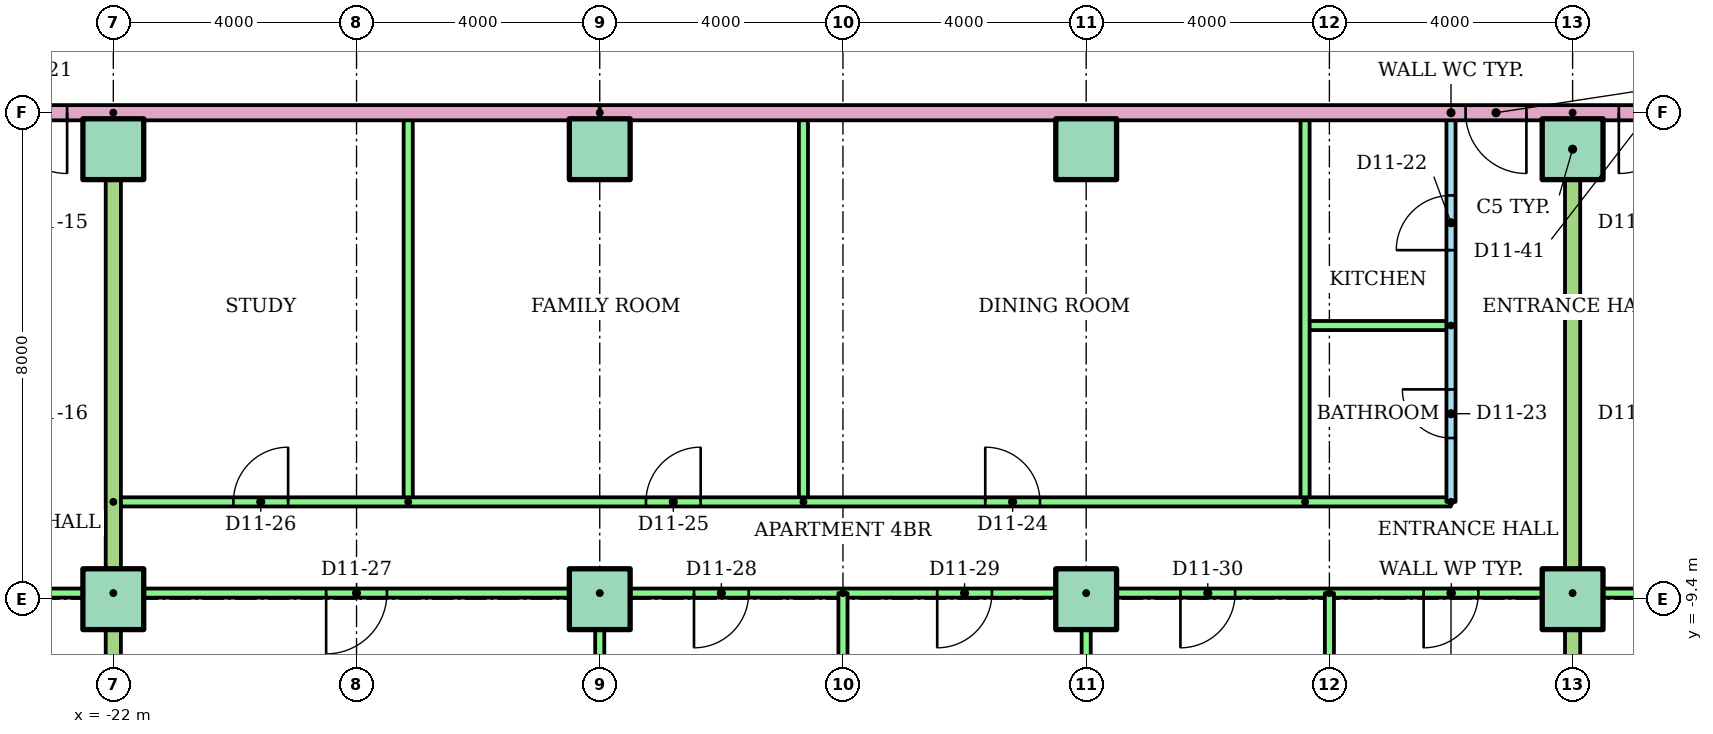
"""IFC4 building model, lengths in metres.
Left out: names, types, materials, properties, quantities, classifications, styles, units other than length and angle.
Written with IfcOpenShell. Run it as: python <this file> out.ifc"""

import sys

from ifc_helpers import new_model, si_unit, direction, frame, frame_2d, origin, origin_2d, place, context, subcontext, project, spatial, rectangle, extrude, element, fill, save


model = new_model("IFC4")
c1 = context("Model", 3, precision=1e-05, world=origin(), true_north=direction((0.0, 1.0)))
c2 = subcontext(c1, "Body", "Model", "MODEL_VIEW")
j1 = project(units=[si_unit("LENGTHUNIT", "METRE"), si_unit("PLANEANGLEUNIT", "RADIAN")], contexts=[c1])
p1 = place(None, origin())
s1 = spatial("IfcSite", under=j1, at=p1, CompositionType="ELEMENT")
p2 = place(p1, origin())
s2 = spatial("IfcBuilding", under=s1, at=p2, CompositionType="ELEMENT")
p3 = place(p2, frame((0.0, 0.0, 44.8)))
s3 = spatial("IfcBuildingStorey", under=s2, at=p3, CompositionType="ELEMENT", Elevation=44.8)
for number, where in (
    (1, (-22.0, -9.4, 0.0)),
    (2, (-14.0, -9.4, 0.0)),
    (3, (-6.0, -9.4, 0.0)),
    (4, (2.0, -9.4, 0.0)),
    (5, (-22.0, -2.0, 0.0)),
    (6, (-14.0, -2.0, 0.0)),
    (7, (-6.0, -2.0, 0.0)),
    (8, (2.0, -2.0, 0.0)),
):
    element("IfcColumn", number, at=place(p3, frame(where)), inside=s3, PredefinedType="COLUMN", context=c2, shape_type="SweptSolid", body=[
        extrude(rectangle(XDim=1.0, YDim=1.0, at=origin_2d()), origin(), (0.0, 0.0, 1.0), 3.2),
    ])
p4 = place(p3, frame((-22.0, -9.3, 0.0), z_axis=(0.0, 0.0, 1.0), x_axis=(-1.0, 0.0, 0.0)))
e9 = element("IfcWall", 9, at=p4, inside=s3, PredefinedType="PARTITIONING", context=c2, shape_type="SweptSolid", body=[
    extrude(rectangle(XDim=14.51, YDim=0.15, at=frame_2d((7.255, 0.0))), origin(), (0.0, 0.0, 1.0), 2.4),
])
p5 = place(p4, frame((11.6, 0.0, 0.0)))
e10 = element("IfcOpeningElement", 10, at=p5, cuts=e9, PredefinedType="OPENING", context=c2, shape_type="SweptSolid", body=[
    extrude(rectangle(XDim=0.9, YDim=2.1, at=frame_2d((0.45, 1.05))), frame((0.0, 0.085, 0.0), z_axis=(0.0, -1.0, 0.0), x_axis=(1.0, 0.0, 0.0)), (0.0, 0.0, 1.0), 0.17),
])
p6 = place(p4, frame((4.4, 0.0, 0.0)))
e11 = element("IfcOpeningElement", 11, at=p6, cuts=e9, PredefinedType="OPENING", context=c2, shape_type="SweptSolid", body=[
    extrude(rectangle(XDim=1.0, YDim=2.1, at=frame_2d((0.5, 1.05))), frame((0.0, 0.085, 0.0), z_axis=(0.0, -1.0, 0.0), x_axis=(1.0, 0.0, 0.0)), (0.0, 0.0, 1.0), 0.17),
])
p7 = place(p3, frame((0.0, -7.8, 0.0), z_axis=(0.0, 0.0, 1.0), x_axis=(0.0, 1.0, 0.0)))
e12 = element("IfcWall", 12, at=p7, inside=s3, PredefinedType="PARTITIONING", context=c2, shape_type="SweptSolid", body=[
    extrude(rectangle(XDim=6.4, YDim=0.15, at=frame_2d((3.2, 0.0))), origin(), (0.0, 0.0, 1.0), 2.4),
])
p8 = place(p7, frame((4.14, 0.0, 0.0)))
e13 = element("IfcOpeningElement", 13, at=p8, cuts=e12, PredefinedType="OPENING", context=c2, shape_type="SweptSolid", body=[
    extrude(rectangle(XDim=0.9, YDim=2.1, at=frame_2d((0.45, 1.05))), frame((0.0, 0.085, 0.0), z_axis=(0.0, -1.0, 0.0), x_axis=(1.0, 0.0, 0.0)), (0.0, 0.0, 1.0), 0.17),
])
p9 = place(p7, frame((1.05, 0.0, 0.0)))
e14 = element("IfcOpeningElement", 14, at=p9, cuts=e12, PredefinedType="OPENING", context=c2, shape_type="SweptSolid", body=[
    extrude(rectangle(XDim=0.8, YDim=2.1, at=frame_2d((0.4, 1.05))), frame((0.0, 0.085, 0.0), z_axis=(0.0, -1.0, 0.0), x_axis=(1.0, 0.0, 0.0)), (0.0, 0.0, 1.0), 0.17),
])
p10 = place(p3, frame((0.0, -4.9, 0.0), z_axis=(0.0, 0.0, 1.0), x_axis=(-1.0, 0.0, 0.0)))
e15 = element("IfcWall", 15, at=p10, inside=s3, PredefinedType="PARTITIONING", context=c2, shape_type="SweptSolid", body=[
    extrude(rectangle(XDim=2.4, YDim=0.15, at=frame_2d((1.2, 0.0))), origin(), (0.0, 0.0, 1.0), 2.4),
])
for number, where, z_axis, x_axis in (
    (16, (-2.4, -7.8, 0.0), (0.0, 0.0, 1.0), (0.0, 1.0, 0.0)),
    (17, (-10.65, -7.8, 0.0), (0.0, 0.0, 1.0), (0.0, 1.0, 0.0)),
    (18, (-17.15, -7.8, 0.0), (0.0, 0.0, 1.0), (0.0, 1.0, 0.0)),
):
    element("IfcWall", number, at=place(p3, frame(where, z_axis=z_axis, x_axis=x_axis)), inside=s3, PredefinedType="PARTITIONING", context=c2, shape_type="SweptSolid", body=[
        extrude(rectangle(XDim=6.4, YDim=0.15, at=frame_2d((3.2, 0.0))), origin(), (0.0, 0.0, 1.0), 2.4),
    ])
p11 = place(p3, frame((-22.0, -7.8, 0.0)))
e19 = element("IfcWall", 19, at=p11, inside=s3, PredefinedType="PARTITIONING", context=c2, shape_type="SweptSolid", body=[
    extrude(rectangle(XDim=22.0, YDim=0.15, at=frame_2d((11.0, 0.0))), origin(), (0.0, 0.0, 1.0), 2.4),
])
p12 = place(p11, frame((14.34, 0.0, 0.0)))
e20 = element("IfcOpeningElement", 20, at=p12, cuts=e19, PredefinedType="OPENING", context=c2, shape_type="SweptSolid", body=[
    extrude(rectangle(XDim=0.9, YDim=2.1, at=frame_2d((0.45, 1.05))), frame((0.0, 0.085, 0.0), z_axis=(0.0, -1.0, 0.0), x_axis=(1.0, 0.0, 0.0)), (0.0, 0.0, 1.0), 0.17),
])
p13 = place(p11, frame((8.76, 0.0, 0.0)))
e21 = element("IfcOpeningElement", 21, at=p13, cuts=e19, PredefinedType="OPENING", context=c2, shape_type="SweptSolid", body=[
    extrude(rectangle(XDim=0.9, YDim=2.1, at=frame_2d((0.45, 1.05))), frame((0.0, 0.085, 0.0), z_axis=(0.0, -1.0, 0.0), x_axis=(1.0, 0.0, 0.0)), (0.0, 0.0, 1.0), 0.17),
])
p14 = place(p11, frame((1.975, 0.0, 0.0)))
e22 = element("IfcOpeningElement", 22, at=p14, cuts=e19, PredefinedType="OPENING", context=c2, shape_type="SweptSolid", body=[
    extrude(rectangle(XDim=0.9, YDim=2.1, at=frame_2d((0.45, 1.05))), frame((0.0, 0.085, 0.0), z_axis=(0.0, -1.0, 0.0), x_axis=(1.0, 0.0, 0.0)), (0.0, 0.0, 1.0), 0.17),
])
p15 = place(p3, frame((2.0, -9.3, 0.0), z_axis=(0.0, 0.0, 1.0), x_axis=(-1.0, 0.0, 0.0)))
e23 = element("IfcWall", 23, at=p15, inside=s3, PredefinedType="PARTITIONING", context=c2, shape_type="SweptSolid", body=[
    extrude(rectangle(XDim=24.0, YDim=0.15, at=frame_2d((12.0, 0.0))), origin(), (0.0, 0.0, 1.0), 2.4),
])
p16 = place(p15, frame((19.5, 0.0, 0.0)))
e24 = element("IfcOpeningElement", 24, at=p16, cuts=e23, PredefinedType="OPENING", context=c2, shape_type="SweptSolid", body=[
    extrude(rectangle(XDim=1.0, YDim=2.1, at=frame_2d((0.5, 1.05))), frame((0.0, 0.085, 0.0), z_axis=(0.0, -1.0, 0.0), x_axis=(1.0, 0.0, 0.0)), (0.0, 0.0, 1.0), 0.17),
])
p17 = place(p15, frame((13.55, 0.0, 0.0)))
e25 = element("IfcOpeningElement", 25, at=p17, cuts=e23, PredefinedType="OPENING", context=c2, shape_type="SweptSolid", body=[
    extrude(rectangle(XDim=0.9, YDim=2.1, at=frame_2d((0.45, 1.05))), frame((0.0, 0.085, 0.0), z_axis=(0.0, -1.0, 0.0), x_axis=(1.0, 0.0, 0.0)), (0.0, 0.0, 1.0), 0.17),
])
p18 = place(p15, frame((9.55, 0.0, 0.0)))
e26 = element("IfcOpeningElement", 26, at=p18, cuts=e23, PredefinedType="OPENING", context=c2, shape_type="SweptSolid", body=[
    extrude(rectangle(XDim=0.9, YDim=2.1, at=frame_2d((0.45, 1.05))), frame((0.0, 0.085, 0.0), z_axis=(0.0, -1.0, 0.0), x_axis=(1.0, 0.0, 0.0)), (0.0, 0.0, 1.0), 0.17),
])
p19 = place(p15, frame((5.55, 0.0, 0.0)))
e27 = element("IfcOpeningElement", 27, at=p19, cuts=e23, PredefinedType="OPENING", context=c2, shape_type="SweptSolid", body=[
    extrude(rectangle(XDim=0.9, YDim=2.1, at=frame_2d((0.45, 1.05))), frame((0.0, 0.085, 0.0), z_axis=(0.0, -1.0, 0.0), x_axis=(1.0, 0.0, 0.0)), (0.0, 0.0, 1.0), 0.17),
])
p20 = place(p15, frame((1.55, 0.0, 0.0)))
e28 = element("IfcOpeningElement", 28, at=p20, cuts=e23, PredefinedType="OPENING", context=c2, shape_type="SweptSolid", body=[
    extrude(rectangle(XDim=0.9, YDim=2.1, at=frame_2d((0.45, 1.05))), frame((0.0, 0.085, 0.0), z_axis=(0.0, -1.0, 0.0), x_axis=(1.0, 0.0, 0.0)), (0.0, 0.0, 1.0), 0.17),
])
p21 = place(p3, frame((-14.0, -9.3, 0.0), z_axis=(0.0, 0.0, 1.0), x_axis=(0.0, -1.0, 0.0)))
e29 = element("IfcWall", 29, at=p21, inside=s3, PredefinedType="PARTITIONING", context=c2, shape_type="SweptSolid", body=[
    extrude(rectangle(XDim=6.81, YDim=0.15, at=frame_2d((3.405, 0.0))), origin(), (0.0, 0.0, 1.0), 2.4),
])
p22 = place(p3, frame((-10.0, -9.3, 0.0), z_axis=(0.0, 0.0, 1.0), x_axis=(0.0, -1.0, 0.0)))
e30 = element("IfcWall", 30, at=p22, inside=s3, PredefinedType="PARTITIONING", context=c2, shape_type="SweptSolid", body=[
    extrude(rectangle(XDim=6.821, YDim=0.15, at=frame_2d((3.411, 0.0))), origin(), (0.0, 0.0, 1.0), 2.4),
])
p23 = place(p3, frame((-6.0, -9.3, 0.0), z_axis=(0.0, 0.0, 1.0), x_axis=(0.0, -1.0, 0.0)))
e31 = element("IfcWall", 31, at=p23, inside=s3, PredefinedType="PARTITIONING", context=c2, shape_type="SweptSolid", body=[
    extrude(rectangle(XDim=6.81, YDim=0.15, at=frame_2d((3.405, 0.0))), origin(), (0.0, 0.0, 1.0), 2.4),
])
p24 = place(p3, frame((-2.0, -9.3, 0.0), z_axis=(0.0, 0.0, 1.0), x_axis=(0.0, -1.0, 0.0)))
e32 = element("IfcWall", 32, at=p24, inside=s3, PredefinedType="PARTITIONING", context=c2, shape_type="SweptSolid", body=[
    extrude(rectangle(XDim=6.821, YDim=0.15, at=frame_2d((3.411, 0.0))), origin(), (0.0, 0.0, 1.0), 2.4),
])
p25 = place(p3, frame((-22.0, -1.4, 0.0), z_axis=(0.0, 0.0, 1.0), x_axis=(0.0, -1.0, 0.0)))
e33 = element("IfcWall", 33, at=p25, inside=s3, PredefinedType="PARTITIONING", context=c2, shape_type="SweptSolid", body=[
    extrude(rectangle(XDim=14.71, YDim=0.25, at=frame_2d((7.355, 0.0))), origin(), (0.0, 0.0, 1.0), 2.4),
])
p26 = place(p3, frame((18.0, -9.3, 0.0), z_axis=(0.0, 0.0, 1.0), x_axis=(-1.0, 0.0, 0.0)))
e34 = element("IfcWall", 34, at=p26, inside=s3, PredefinedType="PARTITIONING", context=c2, shape_type="SweptSolid", body=[
    extrude(rectangle(XDim=16.0, YDim=0.15, at=frame_2d((8.0, 0.0))), origin(), (0.0, 0.0, 1.0), 2.4),
])
p27 = place(p26, frame((11.5, 0.0, 0.0)))
e35 = element("IfcOpeningElement", 35, at=p27, cuts=e34, PredefinedType="OPENING", context=c2, shape_type="SweptSolid", body=[
    extrude(rectangle(XDim=1.0, YDim=2.1, at=frame_2d((0.5, 1.05))), frame((0.0, 0.085, 0.0), z_axis=(0.0, -1.0, 0.0), x_axis=(1.0, 0.0, 0.0)), (0.0, 0.0, 1.0), 0.17),
])
p28 = place(p26, frame((5.55, 0.0, 0.0)))
e36 = element("IfcOpeningElement", 36, at=p28, cuts=e34, PredefinedType="OPENING", context=c2, shape_type="SweptSolid", body=[
    extrude(rectangle(XDim=0.9, YDim=2.1, at=frame_2d((0.45, 1.05))), frame((0.0, 0.085, 0.0), z_axis=(0.0, -1.0, 0.0), x_axis=(1.0, 0.0, 0.0)), (0.0, 0.0, 1.0), 0.17),
])
p29 = place(p26, frame((1.55, 0.0, 0.0)))
e37 = element("IfcOpeningElement", 37, at=p29, cuts=e34, PredefinedType="OPENING", context=c2, shape_type="SweptSolid", body=[
    extrude(rectangle(XDim=0.9, YDim=2.1, at=frame_2d((0.45, 1.05))), frame((0.0, 0.085, 0.0), z_axis=(0.0, -1.0, 0.0), x_axis=(1.0, 0.0, 0.0)), (0.0, 0.0, 1.0), 0.17),
])
p30 = place(p3, frame((2.0, -1.4, 0.0), z_axis=(0.0, 0.0, 1.0), x_axis=(0.0, -1.0, 0.0)))
e38 = element("IfcWall", 38, at=p30, inside=s3, PredefinedType="PARTITIONING", context=c2, shape_type="SweptSolid", body=[
    extrude(rectangle(XDim=14.71, YDim=0.25, at=frame_2d((7.355, 0.0))), origin(), (0.0, 0.0, 1.0), 2.4),
])
p31 = place(p3, frame((-14.0, -1.4, 0.0), z_axis=(0.0, 0.0, 1.0), x_axis=(-1.0, 0.0, 0.0)))
e39 = element("IfcWall", 39, at=p31, inside=s3, PredefinedType="PARTITIONING", context=c2, shape_type="SweptSolid", body=[
    extrude(rectangle(XDim=15.0, YDim=0.25, at=frame_2d((7.5, 0.0))), origin(), (0.0, 0.0, 1.0), 2.4),
])
p32 = place(p31, frame((8.76, 0.0, 0.0)))
e40 = element("IfcOpeningElement", 40, at=p32, cuts=e39, PredefinedType="OPENING", context=c2, shape_type="SweptSolid", body=[
    extrude(rectangle(XDim=1.0, YDim=2.1, at=frame_2d((0.5, 1.05))), frame((0.0, 0.135, 0.0), z_axis=(0.0, -1.0, 0.0), x_axis=(1.0, 0.0, 0.0)), (0.0, 0.0, 1.0), 0.27),
])
p33 = place(p3, frame((14.0, -1.4, 0.0), z_axis=(0.0, 0.0, 1.0), x_axis=(-1.0, 0.0, 0.0)))
e41 = element("IfcWall", 41, at=p33, inside=s3, PredefinedType="PARTITIONING", context=c2, shape_type="SweptSolid", body=[
    extrude(rectangle(XDim=28.0, YDim=0.25, at=frame_2d((14.0, 0.0))), origin(), (0.0, 0.0, 1.0), 2.4),
])
p34 = place(p33, frame((12.76, 0.0, 0.0)))
e42 = element("IfcOpeningElement", 42, at=p34, cuts=e41, PredefinedType="OPENING", context=c2, shape_type="SweptSolid", body=[
    extrude(rectangle(XDim=1.0, YDim=2.1, at=frame_2d((0.5, 1.05))), frame((0.0, 0.135, 0.0), z_axis=(0.0, -1.0, 0.0), x_axis=(1.0, 0.0, 0.0)), (0.0, 0.0, 1.0), 0.27),
])
p35 = place(p33, frame((10.24, 0.0, 0.0)))
e43 = element("IfcOpeningElement", 43, at=p35, cuts=e41, PredefinedType="OPENING", context=c2, shape_type="SweptSolid", body=[
    extrude(rectangle(XDim=1.0, YDim=2.1, at=frame_2d((0.5, 1.05))), frame((0.0, 0.135, 0.0), z_axis=(0.0, -1.0, 0.0), x_axis=(1.0, 0.0, 0.0)), (0.0, 0.0, 1.0), 0.27),
])
p36 = place(p32, origin())
e44 = element("IfcDoor", 44, at=p36, inside=s3, OperationType="SINGLE_SWING_LEFT", PredefinedType="DOOR", context=c2, shape_type="SweptSolid", body=[
    extrude(rectangle(XDim=1.0, YDim=2.1, at=frame_2d((0.5, 1.05))), frame((0.0, 0.025, 0.0), z_axis=(0.0, -1.0, 0.0), x_axis=(1.0, 0.0, 0.0)), (0.0, 0.0, 1.0), 0.05),
])
fill(e40, e44)
p37 = place(p8, origin())
e45 = element("IfcDoor", 45, at=p37, inside=s3, OperationType="SINGLE_SWING_LEFT", PredefinedType="DOOR", context=c2, shape_type="SweptSolid", body=[
    extrude(rectangle(XDim=0.9, YDim=2.1, at=frame_2d((0.45, 1.05))), frame((0.0, 0.025, 0.0), z_axis=(0.0, -1.0, 0.0), x_axis=(1.0, 0.0, 0.0)), (0.0, 0.0, 1.0), 0.05),
])
fill(e13, e45)
p38 = place(p9, origin())
e46 = element("IfcDoor", 46, at=p38, inside=s3, OperationType="SINGLE_SWING_RIGHT", PredefinedType="DOOR", context=c2, shape_type="SweptSolid", body=[
    extrude(rectangle(XDim=0.8, YDim=2.1, at=frame_2d((0.4, 1.05))), frame((0.0, 0.025, 0.0), z_axis=(0.0, -1.0, 0.0), x_axis=(1.0, 0.0, 0.0)), (0.0, 0.0, 1.0), 0.05),
])
fill(e14, e46)
p39 = place(p12, origin())
e47 = element("IfcDoor", 47, at=p39, inside=s3, OperationType="SINGLE_SWING_LEFT", PredefinedType="DOOR", context=c2, shape_type="SweptSolid", body=[
    extrude(rectangle(XDim=0.9, YDim=2.1, at=frame_2d((0.45, 1.05))), frame((0.0, 0.025, 0.0), z_axis=(0.0, -1.0, 0.0), x_axis=(1.0, 0.0, 0.0)), (0.0, 0.0, 1.0), 0.05),
])
fill(e20, e47)
p40 = place(p13, origin())
e48 = element("IfcDoor", 48, at=p40, inside=s3, OperationType="SINGLE_SWING_RIGHT", PredefinedType="DOOR", context=c2, shape_type="SweptSolid", body=[
    extrude(rectangle(XDim=0.9, YDim=2.1, at=frame_2d((0.45, 1.05))), frame((0.0, 0.025, 0.0), z_axis=(0.0, -1.0, 0.0), x_axis=(1.0, 0.0, 0.0)), (0.0, 0.0, 1.0), 0.05),
])
fill(e21, e48)
p41 = place(p14, origin())
e49 = element("IfcDoor", 49, at=p41, inside=s3, OperationType="SINGLE_SWING_RIGHT", PredefinedType="DOOR", context=c2, shape_type="SweptSolid", body=[
    extrude(rectangle(XDim=0.9, YDim=2.1, at=frame_2d((0.45, 1.05))), frame((0.0, 0.025, 0.0), z_axis=(0.0, -1.0, 0.0), x_axis=(1.0, 0.0, 0.0)), (0.0, 0.0, 1.0), 0.05),
])
fill(e22, e49)
p42 = place(p16, origin())
e50 = element("IfcDoor", 50, at=p42, inside=s3, OperationType="SINGLE_SWING_RIGHT", PredefinedType="DOOR", context=c2, shape_type="SweptSolid", body=[
    extrude(rectangle(XDim=1.0, YDim=2.1, at=frame_2d((0.5, 1.05))), frame((0.0, 0.025, 0.0), z_axis=(0.0, -1.0, 0.0), x_axis=(1.0, 0.0, 0.0)), (0.0, 0.0, 1.0), 0.05),
])
fill(e24, e50)
p43 = place(p17, origin())
e51 = element("IfcDoor", 51, at=p43, inside=s3, OperationType="SINGLE_SWING_RIGHT", PredefinedType="DOOR", context=c2, shape_type="SweptSolid", body=[
    extrude(rectangle(XDim=0.9, YDim=2.1, at=frame_2d((0.45, 1.05))), frame((0.0, 0.025, 0.0), z_axis=(0.0, -1.0, 0.0), x_axis=(1.0, 0.0, 0.0)), (0.0, 0.0, 1.0), 0.05),
])
fill(e25, e51)
p44 = place(p18, origin())
e52 = element("IfcDoor", 52, at=p44, inside=s3, OperationType="SINGLE_SWING_RIGHT", PredefinedType="DOOR", context=c2, shape_type="SweptSolid", body=[
    extrude(rectangle(XDim=0.9, YDim=2.1, at=frame_2d((0.45, 1.05))), frame((0.0, 0.025, 0.0), z_axis=(0.0, -1.0, 0.0), x_axis=(1.0, 0.0, 0.0)), (0.0, 0.0, 1.0), 0.05),
])
fill(e26, e52)
p45 = place(p19, origin())
e53 = element("IfcDoor", 53, at=p45, inside=s3, OperationType="SINGLE_SWING_RIGHT", PredefinedType="DOOR", context=c2, shape_type="SweptSolid", body=[
    extrude(rectangle(XDim=0.9, YDim=2.1, at=frame_2d((0.45, 1.05))), frame((0.0, 0.025, 0.0), z_axis=(0.0, -1.0, 0.0), x_axis=(1.0, 0.0, 0.0)), (0.0, 0.0, 1.0), 0.05),
])
fill(e27, e53)
p46 = place(p20, origin())
e54 = element("IfcDoor", 54, at=p46, inside=s3, OperationType="SINGLE_SWING_RIGHT", PredefinedType="DOOR", context=c2, shape_type="SweptSolid", body=[
    extrude(rectangle(XDim=0.9, YDim=2.1, at=frame_2d((0.45, 1.05))), frame((0.0, 0.025, 0.0), z_axis=(0.0, -1.0, 0.0), x_axis=(1.0, 0.0, 0.0)), (0.0, 0.0, 1.0), 0.05),
])
fill(e28, e54)
p47 = place(p34, origin())
e55 = element("IfcDoor", 55, at=p47, inside=s3, OperationType="SINGLE_SWING_LEFT", PredefinedType="DOOR", context=c2, shape_type="SweptSolid", body=[
    extrude(rectangle(XDim=1.0, YDim=2.1, at=frame_2d((0.5, 1.05))), frame((0.0, 0.025, 0.0), z_axis=(0.0, -1.0, 0.0), x_axis=(1.0, 0.0, 0.0)), (0.0, 0.0, 1.0), 0.05),
])
fill(e42, e55)
p48 = place(p35, origin())
e56 = element("IfcDoor", 56, at=p48, inside=s3, OperationType="SINGLE_SWING_RIGHT", PredefinedType="DOOR", context=c2, shape_type="SweptSolid", body=[
    extrude(rectangle(XDim=1.0, YDim=2.1, at=frame_2d((0.5, 1.05))), frame((0.0, 0.025, 0.0), z_axis=(0.0, -1.0, 0.0), x_axis=(1.0, 0.0, 0.0)), (0.0, 0.0, 1.0), 0.05),
])
fill(e43, e56)
save(model, sys.argv[1])
